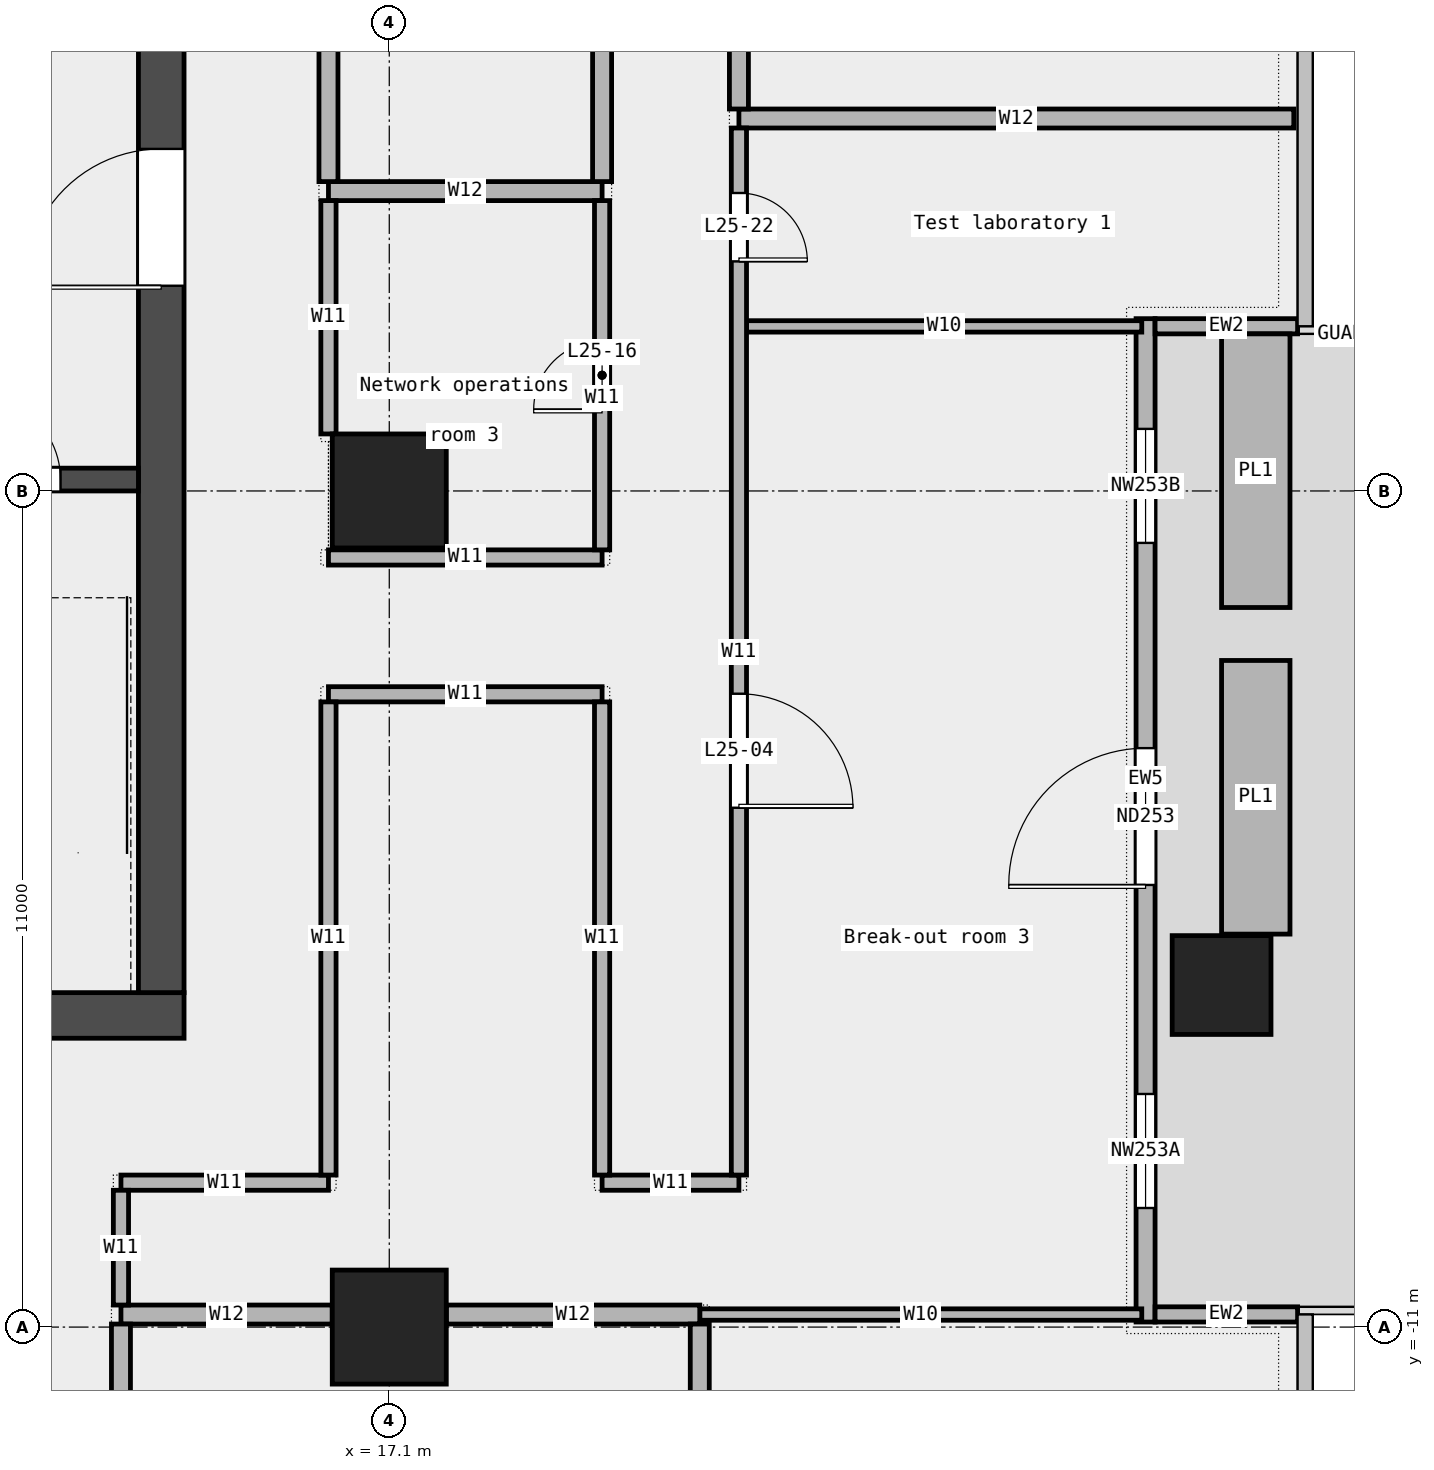
"""IFC4 building model, lengths in metres.
Left out: names, types, materials, properties, quantities, classifications, styles, units other than length and angle.
Written with IfcOpenShell. Run it as: python <this file> out.ifc"""

import sys

from ifc_helpers import new_model, si_unit, direction, frame, frame_2d, origin, origin_2d, place, context, subcontext, project, spatial, rectangle, extrude, element, fill, save


model = new_model("IFC4")
c1 = context("Model", 3, precision=1e-05, world=origin(), true_north=direction((0.0, 1.0)))
c2 = subcontext(c1, "Body", "Model", "MODEL_VIEW")
j1 = project(units=[si_unit("LENGTHUNIT", "METRE"), si_unit("PLANEANGLEUNIT", "RADIAN")], contexts=[c1])
p1 = place(None, origin())
s1 = spatial("IfcSite", under=j1, at=p1, CompositionType="ELEMENT")
p2 = place(p1, origin())
s2 = spatial("IfcBuilding", under=s1, at=p2, CompositionType="ELEMENT")
p3 = place(p2, frame((0.0, 0.0, 126.1)))
s3 = spatial("IfcBuildingStorey", under=s2, at=p3, CompositionType="ELEMENT", Elevation=126.1)
p4 = place(p3, frame((28.05, -6.5, 0.0), z_axis=(0.0, 0.0, 1.0), x_axis=(1.0, 0.0, 0.0)))
e1 = element("IfcColumn", 1, at=p4, inside=s3, PredefinedType="COLUMN", context=c2, shape_type="SweptSolid", body=[
    extrude(rectangle(XDim=1.3, YDim=1.3, at=origin_2d()), origin(), (0.0, 0.0, 1.0), 4.05),
])
for number, where, z_axis, x_axis in (
    (2, (17.1, -11.0, 0.0), (0.0, 0.0, 1.0), (1.0, 0.0, 0.0)),
    (3, (17.1, 0.0, 0.0), (0.0, 0.0, 1.0), (1.0, 0.0, 0.0)),
):
    element("IfcColumn", number, at=place(p3, frame(where, z_axis=z_axis, x_axis=x_axis)), inside=s3, PredefinedType="COLUMN", context=c2, shape_type="SweptSolid", body=[
        extrude(rectangle(XDim=1.5, YDim=1.5, at=origin_2d()), origin(), (0.0, 0.0, 1.0), 4.05),
    ])
p5 = place(p3, frame((27.05, -10.933, 0.0), z_axis=(0.0, 0.0, 1.0), x_axis=(0.0, 1.0, 0.0)))
e4 = element("IfcWall", 4, at=p5, inside=s3, PredefinedType="STANDARD", context=c2, shape_type="SweptSolid", body=[
    extrude(rectangle(XDim=13.2, YDim=0.25, at=frame_2d((6.6, 0.0))), origin(), (0.0, 0.0, 1.0), 4.05),
])
p6 = place(p5, frame((1.5, 0.0, 0.45)))
e5 = element("IfcOpeningElement", 5, at=p6, cuts=e4, PredefinedType="OPENING", context=c2, shape_type="SweptSolid", body=[
    extrude(rectangle(XDim=1.5, YDim=3.0, at=frame_2d((0.75, 1.5))), frame((0.0, 0.137, 0.0), z_axis=(0.0, -1.0, 0.0), x_axis=(1.0, 0.0, 0.0)), (0.0, 0.0, 1.0), 0.274),
])
p7 = place(p5, frame((5.75, 0.0, 0.0)))
e6 = element("IfcOpeningElement", 6, at=p7, cuts=e4, PredefinedType="OPENING", context=c2, shape_type="SweptSolid", body=[
    extrude(rectangle(XDim=1.8, YDim=2.4, at=frame_2d((0.9, 1.2))), frame((0.0, 0.137, 0.0), z_axis=(0.0, -1.0, 0.0), x_axis=(1.0, 0.0, 0.0)), (0.0, 0.0, 1.0), 0.274),
])
p8 = place(p5, frame((10.25, 0.0, 0.45)))
e7 = element("IfcOpeningElement", 7, at=p8, cuts=e4, PredefinedType="OPENING", context=c2, shape_type="SweptSolid", body=[
    extrude(rectangle(XDim=1.5, YDim=3.0, at=frame_2d((0.75, 1.5))), frame((0.0, 0.137, 0.0), z_axis=(0.0, -1.0, 0.0), x_axis=(1.0, 0.0, 0.0)), (0.0, 0.0, 1.0), 0.274),
])
for number, where, z_axis, x_axis in (
    (8, (29.05, -10.833, 0.0), (0.0, 0.0, 1.0), (-1.0, 0.0, 0.0)),
    (9, (29.05, 2.167, 0.0), (0.0, 0.0, 1.0), (-1.0, 0.0, 0.0)),
):
    element("IfcWall", number, at=place(p3, frame(where, z_axis=z_axis, x_axis=x_axis)), inside=s3, PredefinedType="STANDARD", context=c2, shape_type="SweptSolid", body=[
        extrude(rectangle(XDim=1.875, YDim=0.2, at=frame_2d((0.938, 0.0))), origin(), (0.0, 0.0, 1.0), 4.05),
    ])
for number, where, z_axis, x_axis in (
    (10, (28.5, -5.83, 0.0), (0.0, 0.0, 1.0), (0.0, 1.0, 0.0)),
    (11, (28.5, -1.533, 0.0), (0.0, 0.0, 1.0), (0.0, 1.0, 0.0)),
):
    element("IfcWall", number, at=place(p3, frame(where, z_axis=z_axis, x_axis=x_axis)), inside=s3, PredefinedType="STANDARD", context=c2, shape_type="SweptSolid", body=[
        extrude(rectangle(XDim=3.6, YDim=0.9, at=frame_2d((1.8, 0.0))), origin(), (0.0, 0.0, 1.0), 0.7),
    ])
p9 = place(p3, frame((21.185, -10.835, 0.0), z_axis=(0.0, 0.0, 1.0), x_axis=(1.0, 0.0, 0.0)))
e12 = element("IfcWall", 12, at=p9, inside=s3, PredefinedType="PARTITIONING", context=c2, shape_type="SweptSolid", body=[
    extrude(rectangle(XDim=5.815, YDim=0.15, at=frame_2d((2.907, 0.0))), origin(), (0.0, 0.0, 1.0), 4.05),
])
p10 = place(p3, frame((13.57, -10.835, 0.0), z_axis=(0.0, 0.0, 1.0), x_axis=(1.0, 0.0, 0.0)))
e13 = element("IfcWall", 13, at=p10, inside=s3, PredefinedType="PARTITIONING", context=c2, shape_type="SweptSolid", body=[
    extrude(rectangle(XDim=2.78, YDim=0.25, at=frame_2d((1.39, 0.0))), origin(), (0.0, 0.0, 1.0), 4.05),
])
p11 = place(p3, frame((17.85, -10.835, 0.0), z_axis=(0.0, 0.0, 1.0), x_axis=(1.0, 0.0, 0.0)))
e14 = element("IfcWall", 14, at=p11, inside=s3, PredefinedType="PARTITIONING", context=c2, shape_type="SweptSolid", body=[
    extrude(rectangle(XDim=3.335, YDim=0.25, at=frame_2d((1.667, 0.0))), origin(), (0.0, 0.0, 1.0), 4.05),
])
p12 = place(p3, frame((13.57, -9.1, 0.0), z_axis=(0.0, 0.0, 1.0), x_axis=(1.0, 0.0, 0.0)))
e15 = element("IfcWall", 15, at=p12, inside=s3, PredefinedType="PARTITIONING", context=c2, shape_type="SweptSolid", body=[
    extrude(rectangle(XDim=2.73, YDim=0.2, at=frame_2d((1.365, 0.0))), origin(), (0.0, 0.0, 1.0), 4.05),
])
p13 = place(p3, frame((19.9, -9.1, 0.0), z_axis=(0.0, 0.0, 1.0), x_axis=(1.0, 0.0, 0.0)))
e16 = element("IfcWall", 16, at=p13, inside=s3, PredefinedType="PARTITIONING", context=c2, shape_type="SweptSolid", body=[
    extrude(rectangle(XDim=1.8, YDim=0.2, at=frame_2d((0.9, 0.0))), origin(), (0.0, 0.0, 1.0), 4.05),
])
for number, where, z_axis, x_axis in (
    (17, (16.3, -2.675, 0.0), (0.0, 0.0, 1.0), (1.0, 0.0, 0.0)),
    (18, (16.3, -0.875, 0.0), (0.0, 0.0, 1.0), (1.0, 0.0, 0.0)),
):
    element("IfcWall", number, at=place(p3, frame(where, z_axis=z_axis, x_axis=x_axis)), inside=s3, PredefinedType="PARTITIONING", context=c2, shape_type="SweptSolid", body=[
        extrude(rectangle(XDim=3.6, YDim=0.2, at=frame_2d((1.8, 0.0))), origin(), (0.0, 0.0, 1.0), 4.05),
    ])
p14 = place(p3, frame((21.8, 2.165, 0.0), z_axis=(0.0, 0.0, 1.0), x_axis=(1.0, 0.0, 0.0)))
e19 = element("IfcWall", 19, at=p14, inside=s3, PredefinedType="PARTITIONING", context=c2, shape_type="SweptSolid", body=[
    extrude(rectangle(XDim=5.2, YDim=0.15, at=frame_2d((2.6, 0.0))), origin(), (0.0, 0.0, 1.0), 4.05),
])
p15 = place(p3, frame((16.3, 3.945, 0.0), z_axis=(0.0, 0.0, 1.0), x_axis=(1.0, 0.0, 0.0)))
e20 = element("IfcWall", 20, at=p15, inside=s3, PredefinedType="PARTITIONING", context=c2, shape_type="SweptSolid", body=[
    extrude(rectangle(XDim=3.6, YDim=0.25, at=frame_2d((1.8, 0.0))), origin(), (0.0, 0.0, 1.0), 4.05),
])
p16 = place(p3, frame((21.7, 4.9, 0.0), z_axis=(0.0, 0.0, 1.0), x_axis=(1.0, 0.0, 0.0)))
e21 = element("IfcWall", 21, at=p16, inside=s3, PredefinedType="PARTITIONING", context=c2, shape_type="SweptSolid", body=[
    extrude(rectangle(XDim=7.3, YDim=0.25, at=frame_2d((3.65, 0.0))), origin(), (0.0, 0.0, 1.0), 4.05),
])
p17 = place(p3, frame((13.57, -10.71, 0.0), z_axis=(0.0, 0.0, 1.0), x_axis=(0.0, 1.0, 0.0)))
e22 = element("IfcWall", 22, at=p17, inside=s3, PredefinedType="PARTITIONING", context=c2, shape_type="SweptSolid", body=[
    extrude(rectangle(XDim=1.51, YDim=0.2, at=frame_2d((0.755, 0.0))), origin(), (0.0, 0.0, 1.0), 4.05),
])
p18 = place(p3, frame((13.57, -14.325, 0.0), z_axis=(0.0, 0.0, 1.0), x_axis=(0.0, 1.0, 0.0)))
e23 = element("IfcWall", 23, at=p18, inside=s3, PredefinedType="PARTITIONING", context=c2, shape_type="SweptSolid", body=[
    extrude(rectangle(XDim=3.365, YDim=0.25, at=frame_2d((1.683, 0.0))), origin(), (0.0, 0.0, 1.0), 4.05),
])
p19 = place(p3, frame((16.3, -9.0, 0.0), z_axis=(0.0, 0.0, 1.0), x_axis=(0.0, 1.0, 0.0)))
e24 = element("IfcWall", 24, at=p19, inside=s3, PredefinedType="PARTITIONING", context=c2, shape_type="SweptSolid", body=[
    extrude(rectangle(XDim=6.225, YDim=0.2, at=frame_2d((3.113, 0.0))), origin(), (0.0, 0.0, 1.0), 4.05),
])
p20 = place(p3, frame((16.3, 0.75, 0.0), z_axis=(0.0, 0.0, 1.0), x_axis=(0.0, 1.0, 0.0)))
e25 = element("IfcWall", 25, at=p20, inside=s3, PredefinedType="PARTITIONING", context=c2, shape_type="SweptSolid", body=[
    extrude(rectangle(XDim=3.07, YDim=0.2, at=frame_2d((1.535, 0.0))), origin(), (0.0, 0.0, 1.0), 4.05),
])
p21 = place(p3, frame((16.3, 4.07, 0.0), z_axis=(0.0, 0.0, 1.0), x_axis=(0.0, 1.0, 0.0)))
e26 = element("IfcWall", 26, at=p21, inside=s3, PredefinedType="PARTITIONING", context=c2, shape_type="SweptSolid", body=[
    extrude(rectangle(XDim=6.18, YDim=0.25, at=frame_2d((3.09, 0.0))), origin(), (0.0, 0.0, 1.0), 4.05),
])
p22 = place(p3, frame((19.9, -9.0, 0.0), z_axis=(0.0, 0.0, 1.0), x_axis=(0.0, 1.0, 0.0)))
e27 = element("IfcWall", 27, at=p22, inside=s3, PredefinedType="PARTITIONING", context=c2, shape_type="SweptSolid", body=[
    extrude(rectangle(XDim=6.225, YDim=0.2, at=frame_2d((3.113, 0.0))), origin(), (0.0, 0.0, 1.0), 4.05),
])
p23 = place(p3, frame((19.9, -0.775, 0.0), z_axis=(0.0, 0.0, 1.0), x_axis=(0.0, 1.0, 0.0)))
e28 = element("IfcWall", 28, at=p23, inside=s3, PredefinedType="PARTITIONING", context=c2, shape_type="SweptSolid", body=[
    extrude(rectangle(XDim=4.595, YDim=0.2, at=frame_2d((2.297, 0.0))), origin(), (0.0, 0.0, 1.0), 4.05),
])
p24 = place(p23, frame((1.847, 0.0, 0.0)))
e29 = element("IfcOpeningElement", 29, at=p24, cuts=e28, PredefinedType="OPENING", context=c2, shape_type="SweptSolid", body=[
    extrude(rectangle(XDim=0.9, YDim=2.1, at=frame_2d((0.45, 1.05))), frame((0.0, 0.112, 0.0), z_axis=(0.0, -1.0, 0.0), x_axis=(1.0, 0.0, 0.0)), (0.0, 0.0, 1.0), 0.224),
])
p25 = place(p3, frame((19.9, 4.07, 0.0), z_axis=(0.0, 0.0, 1.0), x_axis=(0.0, 1.0, 0.0)))
e30 = element("IfcWall", 30, at=p25, inside=s3, PredefinedType="PARTITIONING", context=c2, shape_type="SweptSolid", body=[
    extrude(rectangle(XDim=11.18, YDim=0.25, at=frame_2d((5.59, 0.0))), origin(), (0.0, 0.0, 1.0), 4.05),
])
p26 = place(p25, frame((2.377, 0.0, 0.0)))
e31 = element("IfcOpeningElement", 31, at=p26, cuts=e30, PredefinedType="OPENING", context=c2, shape_type="SweptSolid", body=[
    extrude(rectangle(XDim=0.9, YDim=2.1, at=frame_2d((0.45, 1.05))), frame((0.0, 0.137, 0.0), z_axis=(0.0, -1.0, 0.0), x_axis=(1.0, 0.0, 0.0)), (0.0, 0.0, 1.0), 0.274),
])
p27 = place(p25, frame((7.968, 0.0, 0.0)))
e32 = element("IfcOpeningElement", 32, at=p27, cuts=e30, PredefinedType="OPENING", context=c2, shape_type="SweptSolid", body=[
    extrude(rectangle(XDim=0.9, YDim=2.1, at=frame_2d((0.45, 1.05))), frame((0.0, 0.137, 0.0), z_axis=(0.0, -1.0, 0.0), x_axis=(1.0, 0.0, 0.0)), (0.0, 0.0, 1.0), 0.274),
])
p28 = place(p3, frame((21.185, -14.325, 0.0), z_axis=(0.0, 0.0, 1.0), x_axis=(0.0, 1.0, 0.0)))
e33 = element("IfcWall", 33, at=p28, inside=s3, PredefinedType="PARTITIONING", context=c2, shape_type="SweptSolid", body=[
    extrude(rectangle(XDim=3.365, YDim=0.25, at=frame_2d((1.683, 0.0))), origin(), (0.0, 0.0, 1.0), 4.05),
])
p29 = place(p3, frame((21.7, -9.0, 0.0), z_axis=(0.0, 0.0, 1.0), x_axis=(0.0, 1.0, 0.0)))
e34 = element("IfcWall", 34, at=p29, inside=s3, PredefinedType="PARTITIONING", context=c2, shape_type="SweptSolid", body=[
    extrude(rectangle(XDim=13.775, YDim=0.2, at=frame_2d((6.887, 0.0))), origin(), (0.0, 0.0, 1.0), 4.05),
])
p30 = place(p29, frame((4.833, 0.0, 0.0)))
e35 = element("IfcOpeningElement", 35, at=p30, cuts=e34, PredefinedType="OPENING", context=c2, shape_type="SweptSolid", body=[
    extrude(rectangle(XDim=1.5, YDim=2.1, at=frame_2d((0.75, 1.05))), frame((0.0, 0.112, 0.0), z_axis=(0.0, -1.0, 0.0), x_axis=(1.0, 0.0, 0.0)), (0.0, 0.0, 1.0), 0.224),
])
p31 = place(p29, frame((12.02, 0.0, 0.0)))
e36 = element("IfcOpeningElement", 36, at=p31, cuts=e34, PredefinedType="OPENING", context=c2, shape_type="SweptSolid", body=[
    extrude(rectangle(XDim=0.9, YDim=2.1, at=frame_2d((0.45, 1.05))), frame((0.0, 0.112, 0.0), z_axis=(0.0, -1.0, 0.0), x_axis=(1.0, 0.0, 0.0)), (0.0, 0.0, 1.0), 0.224),
])
p32 = place(p3, frame((21.7, 5.025, 0.0), z_axis=(0.0, 0.0, 1.0), x_axis=(0.0, 1.0, 0.0)))
e37 = element("IfcWall", 37, at=p32, inside=s3, PredefinedType="PARTITIONING", context=c2, shape_type="SweptSolid", body=[
    extrude(rectangle(XDim=10.25, YDim=0.25, at=frame_2d((5.125, 0.0))), origin(), (0.0, 0.0, 1.0), 4.05),
])
p33 = place(p32, frame((4.525, 0.0, 0.0)))
e38 = element("IfcOpeningElement", 38, at=p33, cuts=e37, PredefinedType="OPENING", context=c2, shape_type="SweptSolid", body=[
    extrude(rectangle(XDim=1.2, YDim=2.1, at=frame_2d((0.6, 1.05))), frame((0.0, 0.137, 0.0), z_axis=(0.0, -1.0, 0.0), x_axis=(1.0, 0.0, 0.0)), (0.0, 0.0, 1.0), 0.274),
])
p34 = place(p3, frame((-14.4, -6.9, 0.0), z_axis=(0.0, 0.0, 1.0), x_axis=(1.0, 0.0, 0.0)))
e39 = element("IfcWall", 39, at=p34, inside=s3, PredefinedType="SHEAR", context=c2, shape_type="SweptSolid", body=[
    extrude(rectangle(XDim=28.8, YDim=0.6, at=frame_2d((14.4, 0.0))), origin(), (0.0, 0.0, 1.0), 4.2),
])
p35 = place(p34, frame((4.9, 0.0, 0.0)))
e40 = element("IfcOpeningElement", 40, at=p35, cuts=e39, PredefinedType="OPENING", context=c2, shape_type="SweptSolid", body=[
    extrude(rectangle(XDim=1.0, YDim=2.1, at=frame_2d((0.5, 1.05))), frame((0.0, 0.312, 0.0), z_axis=(0.0, -1.0, 0.0), x_axis=(1.0, 0.0, 0.0)), (0.0, 0.0, 1.0), 0.624),
])
p36 = place(p34, frame((9.675, 0.0, 0.0)))
e41 = element("IfcOpeningElement", 41, at=p36, cuts=e39, PredefinedType="OPENING", context=c2, shape_type="SweptSolid", body=[
    extrude(rectangle(XDim=1.2, YDim=2.1, at=frame_2d((0.6, 1.05))), frame((0.0, 0.312, 0.0), z_axis=(0.0, -1.0, 0.0), x_axis=(1.0, 0.0, 0.0)), (0.0, 0.0, 1.0), 0.624),
])
p37 = place(p34, frame((14.837, 0.0, 0.0)))
e42 = element("IfcOpeningElement", 42, at=p37, cuts=e39, PredefinedType="OPENING", context=c2, shape_type="SweptSolid", body=[
    extrude(rectangle(XDim=1.0, YDim=2.1, at=frame_2d((0.5, 1.05))), frame((0.0, 0.312, 0.0), z_axis=(0.0, -1.0, 0.0), x_axis=(1.0, 0.0, 0.0)), (0.0, 0.0, 1.0), 0.624),
])
p38 = place(p34, frame((18.75, 0.0, 0.0)))
e43 = element("IfcOpeningElement", 43, at=p38, cuts=e39, PredefinedType="OPENING", context=c2, shape_type="SweptSolid", body=[
    extrude(rectangle(XDim=1.8, YDim=2.1, at=frame_2d((0.9, 1.05))), frame((0.0, 0.312, 0.0), z_axis=(0.0, -1.0, 0.0), x_axis=(1.0, 0.0, 0.0)), (0.0, 0.0, 1.0), 0.624),
])
p39 = place(p34, frame((23.087, 0.0, 0.0)))
e44 = element("IfcOpeningElement", 44, at=p39, cuts=e39, PredefinedType="OPENING", context=c2, shape_type="SweptSolid", body=[
    extrude(rectangle(XDim=1.0, YDim=2.1, at=frame_2d((0.5, 1.05))), frame((0.0, 0.312, 0.0), z_axis=(0.0, -1.0, 0.0), x_axis=(1.0, 0.0, 0.0)), (0.0, 0.0, 1.0), 0.624),
])
p40 = place(p3, frame((14.1, -6.6, 0.0), z_axis=(0.0, 0.0, 1.0), x_axis=(0.0, 1.0, 0.0)))
e45 = element("IfcWall", 45, at=p40, inside=s3, PredefinedType="SHEAR", context=c2, shape_type="SweptSolid", body=[
    extrude(rectangle(XDim=19.5, YDim=0.6, at=frame_2d((9.75, 0.0))), origin(), (0.0, 0.0, 1.0), 4.2),
])
p41 = place(p40, frame((9.3, 0.0, 0.0)))
e46 = element("IfcOpeningElement", 46, at=p41, cuts=e45, PredefinedType="OPENING", context=c2, shape_type="SweptSolid", body=[
    extrude(rectangle(XDim=1.8, YDim=2.1, at=frame_2d((0.9, 1.05))), frame((0.0, 0.312, 0.0), z_axis=(0.0, -1.0, 0.0), x_axis=(1.0, 0.0, 0.0)), (0.0, 0.0, 1.0), 0.624),
])
p42 = place(p3, frame((10.65, 0.15, 0.0), z_axis=(0.0, 0.0, 1.0), x_axis=(1.0, 0.0, 0.0)))
e47 = element("IfcWall", 47, at=p42, inside=s3, PredefinedType="SOLIDWALL", context=c2, shape_type="SweptSolid", body=[
    extrude(rectangle(XDim=3.15, YDim=0.3, at=frame_2d((1.575, 0.0))), origin(), (0.0, 0.0, 1.0), 4.2),
])
p43 = place(p42, frame((1.025, 0.0, 0.0)))
e48 = element("IfcOpeningElement", 48, at=p43, cuts=e47, PredefinedType="OPENING", context=c2, shape_type="SweptSolid", body=[
    extrude(rectangle(XDim=1.1, YDim=2.1, at=frame_2d((0.55, 1.05))), frame((0.0, 0.162, 0.0), z_axis=(0.0, -1.0, 0.0), x_axis=(1.0, 0.0, 0.0)), (0.0, 0.0, 1.0), 0.324),
])
p44 = place(p6, origin())
e49 = element("IfcWindow", 49, at=p44, inside=s3, PartitioningType="SINGLE_PANEL", PredefinedType="WINDOW", context=c2, shape_type="SweptSolid", body=[
    extrude(rectangle(XDim=1.5, YDim=3.0, at=frame_2d((0.75, 1.5))), frame((0.0, 0.03, 0.0), z_axis=(0.0, -1.0, 0.0), x_axis=(1.0, 0.0, 0.0)), (0.0, 0.0, 1.0), 0.06),
])
fill(e5, e49)
p45 = place(p7, origin())
e50 = element("IfcDoor", 50, at=p45, inside=s3, OperationType="DOUBLE_DOOR_SINGLE_SWING", PredefinedType="DOOR", context=c2, shape_type="SweptSolid", body=[
    extrude(rectangle(XDim=1.8, YDim=2.4, at=frame_2d((0.9, 1.2))), frame((0.0, 0.025, 0.0), z_axis=(0.0, -1.0, 0.0), x_axis=(1.0, 0.0, 0.0)), (0.0, 0.0, 1.0), 0.05),
])
fill(e6, e50)
p46 = place(p8, origin())
e51 = element("IfcWindow", 51, at=p46, inside=s3, PartitioningType="SINGLE_PANEL", PredefinedType="WINDOW", context=c2, shape_type="SweptSolid", body=[
    extrude(rectangle(XDim=1.5, YDim=3.0, at=frame_2d((0.75, 1.5))), frame((0.0, 0.03, 0.0), z_axis=(0.0, -1.0, 0.0), x_axis=(1.0, 0.0, 0.0)), (0.0, 0.0, 1.0), 0.06),
])
fill(e7, e51)
p47 = place(p30, origin())
e52 = element("IfcDoor", 52, at=p47, inside=s3, OperationType="DOUBLE_DOOR_SINGLE_SWING", PredefinedType="DOOR", context=c2, shape_type="SweptSolid", body=[
    extrude(rectangle(XDim=1.5, YDim=2.1, at=frame_2d((0.75, 1.05))), frame((0.0, 0.025, 0.0), z_axis=(0.0, -1.0, 0.0), x_axis=(1.0, 0.0, 0.0)), (0.0, 0.0, 1.0), 0.05),
])
fill(e35, e52)
p48 = place(p24, origin())
e53 = element("IfcDoor", 53, at=p48, inside=s3, OperationType="SINGLE_SWING_LEFT", PredefinedType="DOOR", context=c2, shape_type="SweptSolid", body=[
    extrude(rectangle(XDim=0.9, YDim=2.1, at=frame_2d((0.45, 1.05))), frame((0.0, 0.025, 0.0), z_axis=(0.0, -1.0, 0.0), x_axis=(1.0, 0.0, 0.0)), (0.0, 0.0, 1.0), 0.05),
])
fill(e29, e53)
p49 = place(p31, origin())
e54 = element("IfcDoor", 54, at=p49, inside=s3, OperationType="SINGLE_SWING_RIGHT", PredefinedType="DOOR", context=c2, shape_type="SweptSolid", body=[
    extrude(rectangle(XDim=0.9, YDim=2.1, at=frame_2d((0.45, 1.05))), frame((0.0, 0.025, 0.0), z_axis=(0.0, -1.0, 0.0), x_axis=(1.0, 0.0, 0.0)), (0.0, 0.0, 1.0), 0.05),
])
fill(e36, e54)
p50 = place(p43, origin())
e55 = element("IfcDoor", 55, at=p50, inside=s3, OperationType="SINGLE_SWING_RIGHT", PredefinedType="DOOR", context=c2, shape_type="SweptSolid", body=[
    extrude(rectangle(XDim=1.1, YDim=2.1, at=frame_2d((0.55, 1.05))), frame((0.0, 0.025, 0.0), z_axis=(0.0, -1.0, 0.0), x_axis=(1.0, 0.0, 0.0)), (0.0, 0.0, 1.0), 0.05),
])
fill(e48, e55)
p51 = place(p41, origin())
e56 = element("IfcDoor", 56, at=p51, inside=s3, OperationType="DOUBLE_DOOR_SINGLE_SWING", PredefinedType="DOOR", context=c2, shape_type="SweptSolid", body=[
    extrude(rectangle(XDim=1.8, YDim=2.1, at=frame_2d((0.9, 1.05))), frame((0.0, 0.025, 0.0), z_axis=(0.0, -1.0, 0.0), x_axis=(1.0, 0.0, 0.0)), (0.0, 0.0, 1.0), 0.05),
])
fill(e46, e56)
save(model, sys.argv[1])
